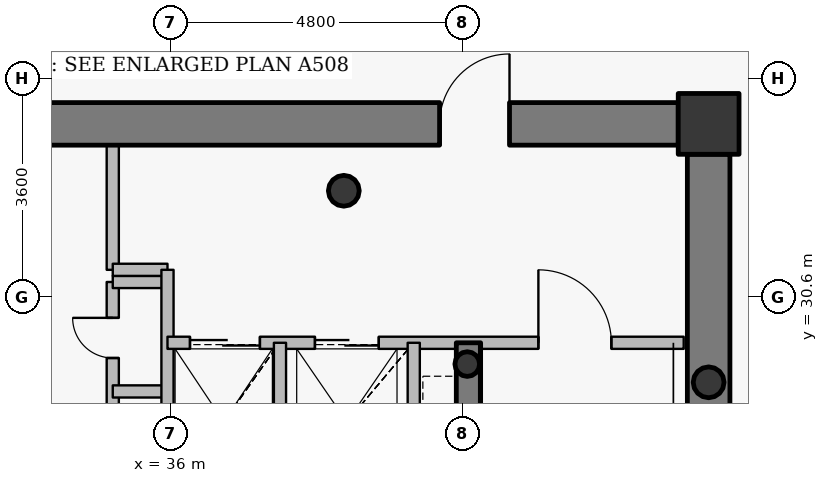
"""IFC4 building model, lengths in metres.
Left out: names, types, materials, properties, quantities, classifications, styles, units other than length and angle.
Written with IfcOpenShell. Run it as: python <this file> out.ifc"""

import sys

from ifc_helpers import new_model, si_unit, direction, frame, frame_2d, origin, origin_2d, place, context, subcontext, project, spatial, rectangle, hollow_circle, extrude, source, transform, mapped, element, fill, save


model = new_model("IFC4")
c1 = context("Model", 3, precision=1e-05, world=origin(), true_north=direction((0.0, 1.0)))
c2 = subcontext(c1, "Body", "Model", "MODEL_VIEW")
j1 = project(units=[si_unit("LENGTHUNIT", "METRE"), si_unit("PLANEANGLEUNIT", "RADIAN")], contexts=[c1])
p1 = place(None, origin())
s1 = spatial("IfcSite", under=j1, at=p1, CompositionType="ELEMENT")
p2 = place(p1, origin())
s2 = spatial("IfcBuilding", under=s1, at=p2, CompositionType="ELEMENT")
p3 = place(p2, frame((0.0, 0.0, 314.25)))
s3 = spatial("IfcBuildingStorey", under=s2, at=p3, CompositionType="ELEMENT", Elevation=314.25)
p4 = place(p3, frame((44.85, 33.45, 0.0), z_axis=(0.0, 0.0, 1.0), x_axis=(1.0, 0.0, 0.0)))
e1 = element("IfcColumn", 1, at=p4, inside=s3, PredefinedType="COLUMN", context=c2, shape_type="SweptSolid", body=[
    extrude(rectangle(XDim=1.0, YDim=1.0, at=origin_2d()), origin(), (0.0, 0.0, 1.0), 3.75),
])
p5 = place(p3, frame((38.85, 32.35, 0.0), z_axis=(0.0, 0.0, 1.0), x_axis=(1.0, 0.0, 0.0)))
e2 = element("IfcColumn", 2, at=p5, inside=s3, PredefinedType="COLUMN", context=c2, shape_type="SweptSolid", body=[
    extrude(hollow_circle(Radius=0.254, WallThickness=0.02, at=origin_2d()), origin(), (0.0, 0.0, 1.0), 3.75),
])
p6 = place(p3, frame((40.88, 29.5, 0.0), z_axis=(0.0, 0.0, 1.0), x_axis=(1.0, 0.0, 0.0)))
e3 = element("IfcColumn", 3, at=p6, inside=s3, PredefinedType="COLUMN", context=c2, shape_type="SweptSolid", body=[
    extrude(hollow_circle(Radius=0.203, WallThickness=0.016, at=origin_2d()), origin(), (0.0, 0.0, 1.0), 3.75),
])
p7 = place(p3, frame((27.65, 33.45, 0.0), z_axis=(0.0, 0.0, 1.0), x_axis=(1.0, 0.0, 0.0)))
e4 = element("IfcWall", 4, at=p7, inside=s3, PredefinedType="SHEAR", context=c2, shape_type="SweptSolid", body=[
    extrude(rectangle(XDim=16.7, YDim=0.7, at=frame_2d((8.35, 0.0))), origin(), (0.0, 0.0, 1.0), 3.0),
])
p8 = place(p7, frame((12.775, 0.0, 0.0)))
e5 = element("IfcOpeningElement", 5, at=p8, cuts=e4, PredefinedType="OPENING", context=c2, shape_type="SweptSolid", body=[
    extrude(rectangle(XDim=1.15, YDim=2.15, at=origin_2d()), frame((0.575, 0.36, 1.075), z_axis=(0.0, -1.0, 0.0), x_axis=(1.0, 0.0, 0.0)), (0.0, 0.0, 1.0), 0.72),
])
p9 = place(p3, frame((44.85, 32.95, 0.0), z_axis=(0.0, 0.0, 1.0), x_axis=(0.0, -1.0, 0.0)))
e6 = element("IfcWall", 6, at=p9, inside=s3, PredefinedType="SHEAR", context=c2, shape_type="SweptSolid", body=[
    extrude(rectangle(XDim=11.9, YDim=0.7, at=frame_2d((5.95, 0.0))), origin(), (0.0, 0.0, 1.0), 3.0),
])
p10 = place(p3, frame((40.9, 27.25, 0.0), z_axis=(0.0, 0.0, 1.0), x_axis=(0.0, 1.0, 0.0)))
e7 = element("IfcWall", 7, at=p10, inside=s3, PredefinedType="SHEAR", context=c2, shape_type="SweptSolid", body=[
    extrude(rectangle(XDim=2.6, YDim=0.4, at=frame_2d((1.3, 0.0))), origin(), (0.0, 0.0, 1.0), 3.05),
])
p11 = place(p3, frame((44.85, 29.2, 0.0), z_axis=(0.0, 0.0, 1.0), x_axis=(1.0, 0.0, 0.0)))
e8 = element("IfcColumn", 8, at=p11, inside=s3, PredefinedType="COLUMN", context=c2, shape_type="SweptSolid", body=[
    extrude(hollow_circle(Radius=0.254, WallThickness=0.02, at=origin_2d()), origin(), (0.0, 0.0, 1.0), 3.75),
])
p12 = place(p3, frame((35.05, 27.25, 0.0), z_axis=(0.0, 0.0, 1.0), x_axis=(0.0, 1.0, 0.0)))
e9 = element("IfcWall", 9, at=p12, inside=s3, PredefinedType="PARTITIONING", context=c2, shape_type="SweptSolid", body=[
    extrude(rectangle(XDim=3.6, YDim=0.2, at=frame_2d((1.8, 0.0))), origin(), (0.0, 0.0, 1.0), 3.45),
])
p13 = place(p12, frame((0.59, 0.0, 0.0)))
e10 = element("IfcOpeningElement", 10, at=p13, cuts=e9, PredefinedType="OPENING", context=c2, shape_type="SweptSolid", body=[
    extrude(rectangle(XDim=0.66, YDim=2.05, at=origin_2d()), frame((0.33, 0.11, 1.025), z_axis=(0.0, -1.0, 0.0), x_axis=(1.0, 0.0, 0.0)), (0.0, 0.0, 1.0), 0.22),
])
p14 = place(p12, frame((2.35, 0.0, 0.0)))
e11 = element("IfcOpeningElement", 11, at=p14, cuts=e9, PredefinedType="OPENING", context=c2, shape_type="SweptSolid", body=[
    extrude(rectangle(XDim=0.66, YDim=2.05, at=origin_2d()), frame((0.33, 0.11, 1.025), z_axis=(0.0, -1.0, 0.0), x_axis=(1.0, 0.0, 0.0)), (0.0, 0.0, 1.0), 0.22),
])
for number, where, z_axis, x_axis in (
    (12, (35.05, 29.05, 0.0), (0.0, 0.0, 1.0), (1.0, 0.0, 0.0)),
    (13, (35.05, 30.85, 0.0), (0.0, 0.0, 1.0), (1.0, 0.0, 0.0)),
):
    element("IfcWall", number, at=place(p3, frame(where, z_axis=z_axis, x_axis=x_axis)), inside=s3, PredefinedType="PARTITIONING", context=c2, shape_type="SweptSolid", body=[
        extrude(rectangle(XDim=0.9, YDim=0.2, at=frame_2d((0.45, 0.0))), origin(), (0.0, 0.0, 1.0), 3.45),
    ])
p15 = place(p3, frame((35.05, 31.05, 0.0), z_axis=(0.0, 0.0, 1.0), x_axis=(0.0, 1.0, 0.0)))
e14 = element("IfcWall", 14, at=p15, inside=s3, PredefinedType="PARTITIONING", context=c2, shape_type="SweptSolid", body=[
    extrude(rectangle(XDim=2.05, YDim=0.2, at=frame_2d((1.025, 0.0))), origin(), (0.0, 0.0, 1.0), 3.035),
])
p16 = place(p3, frame((35.05, 31.05, 0.0), z_axis=(0.0, 0.0, 1.0), x_axis=(1.0, 0.0, 0.0)))
e15 = element("IfcWall", 15, at=p16, inside=s3, PredefinedType="PARTITIONING", context=c2, shape_type="SweptSolid", body=[
    extrude(rectangle(XDim=0.9, YDim=0.2, at=frame_2d((0.45, 0.0))), origin(), (0.0, 0.0, 1.0), 3.45),
])
p17 = place(p3, frame((35.95, 27.25, 0.0), z_axis=(0.0, 0.0, 1.0), x_axis=(0.0, 1.0, 0.0)))
e16 = element("IfcWall", 16, at=p17, inside=s3, PredefinedType="PARTITIONING", context=c2, shape_type="SweptSolid", body=[
    extrude(rectangle(XDim=3.8, YDim=0.2, at=frame_2d((1.9, 0.0))), origin(), (0.0, 0.0, 1.0), 3.45),
])
p18 = place(p3, frame((35.95, 29.85, 0.0), z_axis=(0.0, 0.0, 1.0), x_axis=(1.0, 0.0, 0.0)))
e17 = element("IfcWall", 17, at=p18, inside=s3, PredefinedType="PARTITIONING", context=c2, shape_type="SweptSolid", body=[
    extrude(rectangle(XDim=8.49, YDim=0.2, at=frame_2d((4.245, 0.0))), origin(), (0.0, 0.0, 1.0), 3.035),
])
p19 = place(p18, frame((6.1, 0.0, 0.0)))
e18 = element("IfcOpeningElement", 18, at=p19, cuts=e17, PredefinedType="OPENING", context=c2, shape_type="SweptSolid", body=[
    extrude(rectangle(XDim=1.2, YDim=2.15, at=origin_2d()), frame((0.6, 0.11, 1.075), z_axis=(0.0, -1.0, 0.0), x_axis=(1.0, 0.0, 0.0)), (0.0, 0.0, 1.0), 0.22),
])
p20 = place(p18, frame((0.37, 0.0, 0.0)))
e19 = element("IfcOpeningElement", 19, at=p20, cuts=e17, PredefinedType="OPENING", context=c2, shape_type="SweptSolid", body=[
    extrude(rectangle(XDim=1.15, YDim=2.15, at=origin_2d()), frame((0.575, 0.11, 1.075), z_axis=(0.0, -1.0, 0.0), x_axis=(1.0, 0.0, 0.0)), (0.0, 0.0, 1.0), 0.22),
])
p21 = place(p18, frame((2.425, 0.0, 0.0)))
e20 = element("IfcOpeningElement", 20, at=p21, cuts=e17, PredefinedType="OPENING", context=c2, shape_type="SweptSolid", body=[
    extrude(rectangle(XDim=1.05, YDim=2.15, at=origin_2d()), frame((0.525, 0.11, 1.075), z_axis=(0.0, -1.0, 0.0), x_axis=(1.0, 0.0, 0.0)), (0.0, 0.0, 1.0), 0.22),
])
p22 = place(p3, frame((37.8, 27.25, 0.0), z_axis=(0.0, 0.0, 1.0), x_axis=(0.0, 1.0, 0.0)))
e21 = element("IfcWall", 21, at=p22, inside=s3, PredefinedType="PARTITIONING", context=c2, shape_type="SweptSolid", body=[
    extrude(rectangle(XDim=2.6, YDim=0.2, at=frame_2d((1.3, 0.0))), origin(), (0.0, 0.0, 1.0), 3.45),
])
p23 = place(p3, frame((40.0, 25.45, 0.0), z_axis=(0.0, 0.0, 1.0), x_axis=(0.0, 1.0, 0.0)))
e22 = element("IfcWall", 22, at=p23, inside=s3, PredefinedType="PARTITIONING", context=c2, shape_type="SweptSolid", body=[
    extrude(rectangle(XDim=4.4, YDim=0.2, at=frame_2d((2.2, 0.0))), origin(), (0.0, 0.0, 1.0), 3.45),
])
p24 = place(p3, frame((45.2, 33.8, 0.0), z_axis=(0.0, 0.0, 1.0), x_axis=(-1.0, 0.0, 0.0)))
e23 = element("IfcWall", 23, at=p24, inside=s3, PredefinedType="PARTITIONING", context=c2, shape_type="SweptSolid", body=[
    extrude(rectangle(XDim=0.84, YDim=0.135, at=frame_2d((0.42, 0.0))), origin(), (0.0, 0.0, 1.0), 2.985),
])
p25 = place(p3, frame((45.2, 32.96, 0.0), z_axis=(0.0, 0.0, 1.0), x_axis=(0.0, 1.0, 0.0)))
e24 = element("IfcWall", 24, at=p25, inside=s3, PredefinedType="PARTITIONING", context=c2, shape_type="SweptSolid", body=[
    extrude(rectangle(XDim=0.532, YDim=0.135, at=frame_2d((0.266, 0.0))), origin(), (0.0, 0.0, 1.0), 3.45),
])
m1 = source(origin(), c2, "Body", "SweptSolid", [
    extrude(rectangle(XDim=1.15, YDim=2.15, at=origin_2d()), frame((0.575, 0.025, 1.075), z_axis=(0.0, -1.0, 0.0), x_axis=(1.0, 0.0, 0.0)), (0.0, 0.0, 1.0), 0.05),
])
p26 = place(p8, origin())
e25 = element("IfcDoor", 25, at=p26, inside=s3, OperationType="SINGLE_SWING_RIGHT", PredefinedType="DOOR", context=c2, shape_type="MappedRepresentation", body=[
    mapped(m1, transform((0.0, 0.0, 0.0), x_axis=(1.0, 0.0, 0.0), y_axis=(0.0, 1.0, 0.0), z_axis=(0.0, 0.0, 1.0), scale=1.0)),
])
fill(e5, e25)
m2 = source(origin(), c2, "Body", "SweptSolid", [
    extrude(rectangle(XDim=1.2, YDim=2.15, at=origin_2d()), frame((0.6, 0.025, 1.075), z_axis=(0.0, -1.0, 0.0), x_axis=(1.0, 0.0, 0.0)), (0.0, 0.0, 1.0), 0.05),
])
p27 = place(p19, origin())
e26 = element("IfcDoor", 26, at=p27, inside=s3, OperationType="SINGLE_SWING_LEFT", PredefinedType="DOOR", context=c2, shape_type="MappedRepresentation", body=[
    mapped(m2, transform((0.0, 0.0, 0.0), x_axis=(1.0, 0.0, 0.0), y_axis=(0.0, 1.0, 0.0), z_axis=(0.0, 0.0, 1.0), scale=1.0)),
])
fill(e18, e26)
m3 = source(origin(), c2, "Body", "SweptSolid", [
    extrude(rectangle(XDim=1.15, YDim=2.15, at=origin_2d()), frame((0.575, 0.025, 1.075), z_axis=(0.0, -1.0, 0.0), x_axis=(1.0, 0.0, 0.0)), (0.0, 0.0, 1.0), 0.05),
])
p28 = place(p20, origin())
e27 = element("IfcDoor", 27, at=p28, inside=s3, OperationType="DOUBLE_DOOR_SLIDING", PredefinedType="USERDEFINED", context=c2, shape_type="MappedRepresentation", body=[
    mapped(m3, transform((0.0, 0.0, 0.0), x_axis=(1.0, 0.0, 0.0), y_axis=(0.0, 1.0, 0.0), z_axis=(0.0, 0.0, 1.0), scale=1.0)),
])
fill(e19, e27)
m4 = source(origin(), c2, "Body", "SweptSolid", [
    extrude(rectangle(XDim=1.05, YDim=2.15, at=origin_2d()), frame((0.525, 0.025, 1.075), z_axis=(0.0, -1.0, 0.0), x_axis=(1.0, 0.0, 0.0)), (0.0, 0.0, 1.0), 0.05),
])
p29 = place(p21, origin())
e28 = element("IfcDoor", 28, at=p29, inside=s3, OperationType="DOUBLE_DOOR_SLIDING", PredefinedType="USERDEFINED", context=c2, shape_type="MappedRepresentation", body=[
    mapped(m4, transform((0.0, 0.0, 0.0), x_axis=(1.0, 0.0, 0.0), y_axis=(0.0, 1.0, 0.0), z_axis=(0.0, 0.0, 1.0), scale=1.0)),
])
fill(e20, e28)
m5 = source(origin(), c2, "Body", "SweptSolid", [
    extrude(rectangle(XDim=0.66, YDim=2.05, at=origin_2d()), frame((0.33, 0.025, 1.025), z_axis=(0.0, -1.0, 0.0), x_axis=(1.0, 0.0, 0.0)), (0.0, 0.0, 1.0), 0.05),
])
p30 = place(p14, origin())
e29 = element("IfcDoor", 29, at=p30, inside=s3, OperationType="SINGLE_SWING_RIGHT", PredefinedType="USERDEFINED", context=c2, shape_type="MappedRepresentation", body=[
    mapped(m5, transform((0.0, 0.0, 0.0), x_axis=(1.0, 0.0, 0.0), y_axis=(0.0, 1.0, 0.0), z_axis=(0.0, 0.0, 1.0), scale=1.0)),
])
fill(e11, e29)
save(model, sys.argv[1])
